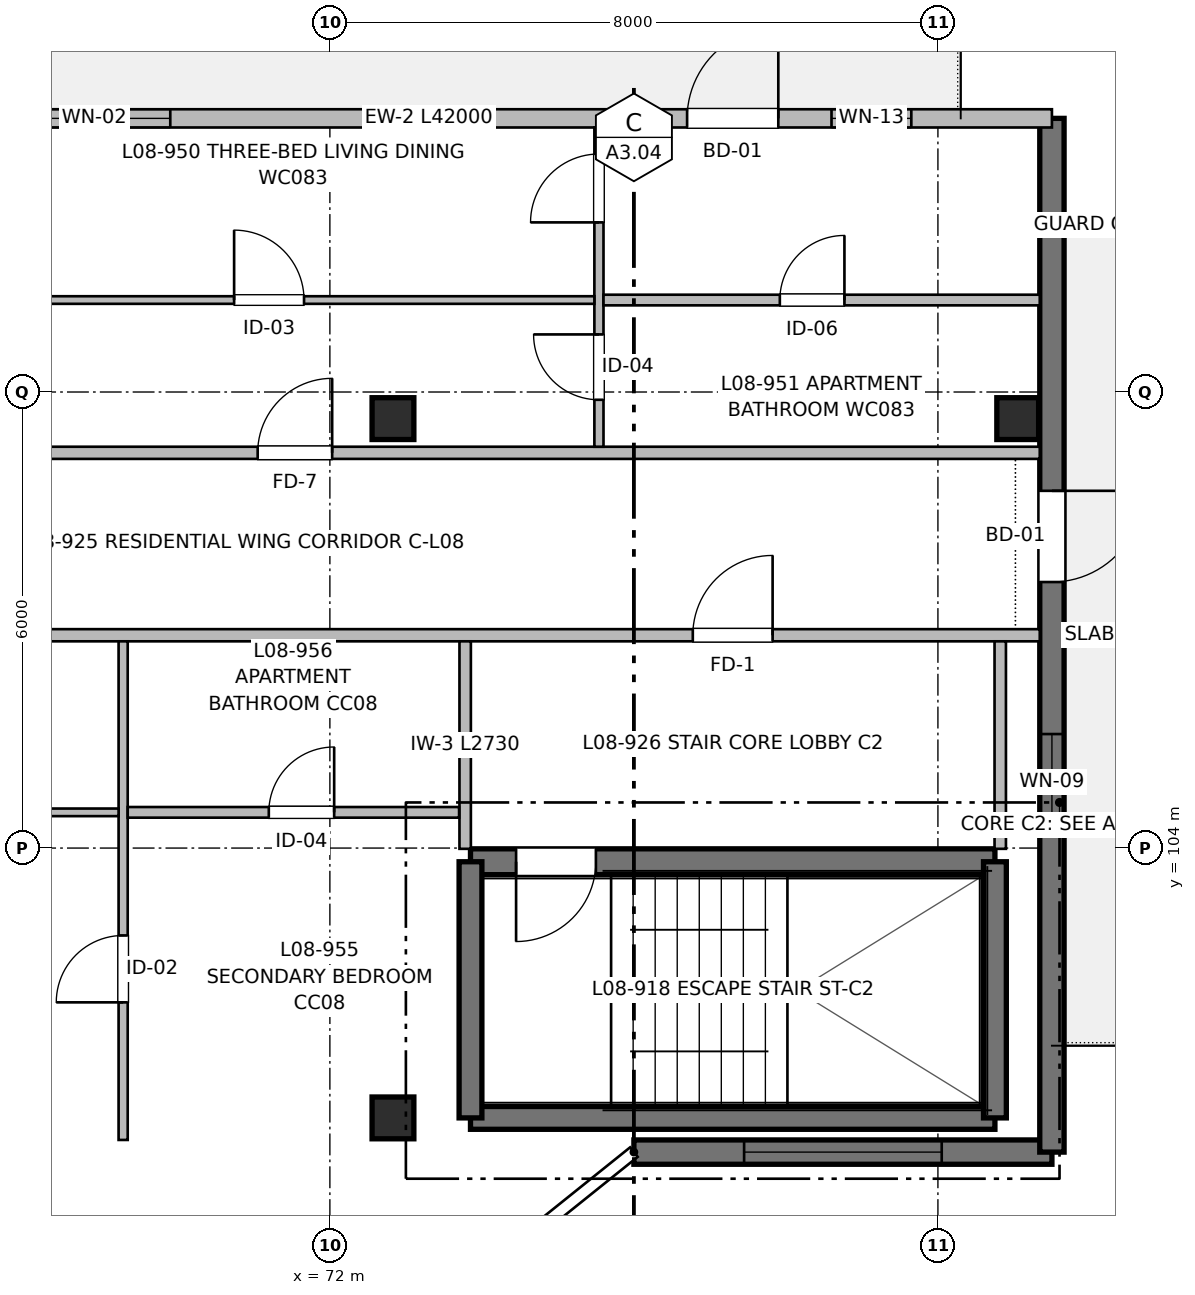
"""IFC4 building model, lengths in metres.
Left out: names, types, materials, properties, quantities, classifications, styles, units other than length and angle.
Written with IfcOpenShell. Run it as: python <this file> out.ifc"""

import sys

from ifc_helpers import new_model, si_unit, direction, frame, frame_2d, origin, origin_2d, place, context, subcontext, project, spatial, rectangle, extrude, element, fill, save


model = new_model("IFC4")
c1 = context("Model", 3, precision=1e-05, world=origin(), true_north=direction((0.0, 1.0)))
c2 = subcontext(c1, "Body", "Model", "MODEL_VIEW")
j1 = project(units=[si_unit("LENGTHUNIT", "METRE"), si_unit("PLANEANGLEUNIT", "RADIAN")], contexts=[c1])
p1 = place(None, origin())
s1 = spatial("IfcSite", under=j1, at=p1, CompositionType="ELEMENT")
p2 = place(p1, origin())
s2 = spatial("IfcBuilding", under=s1, at=p2, CompositionType="ELEMENT")
p3 = place(p2, frame((0.0, 0.0, 26.56)))
s3 = spatial("IfcBuildingStorey", under=s2, at=p3, CompositionType="ELEMENT", Elevation=26.56)
for number, where, z_axis, x_axis in (
    (1, (72.83, 100.45, 0.0), (0.0, 0.0, 1.0), (1.0, 0.0, 0.0)),
    (2, (72.83, 109.65, 0.0), (0.0, 0.0, 1.0), (1.0, 0.0, 0.0)),
    (3, (81.05, 109.65, 0.0), (0.0, 0.0, 1.0), (1.0, 0.0, 0.0)),
):
    element("IfcColumn", number, at=place(p3, frame(where, z_axis=z_axis, x_axis=x_axis)), inside=s3, PredefinedType="COLUMN", context=c2, shape_type="SweptSolid", body=[
        extrude(rectangle(XDim=0.55, YDim=0.55, at=origin_2d()), origin(), (0.0, 0.0, 1.0), 3.2),
    ])
p4 = place(p3, frame((73.85, 100.45, 0.0), z_axis=(0.0, 0.0, 1.0), x_axis=(1.0, 0.0, 0.0)))
e4 = element("IfcWall", 4, at=p4, inside=s3, PredefinedType="SHEAR", context=c2, shape_type="SweptSolid", body=[
    extrude(rectangle(XDim=6.9, YDim=0.3, at=frame_2d((3.45, 0.0))), origin(), (0.0, 0.0, 1.0), 3.2),
])
p5 = place(p3, frame((80.75, 103.82, 0.0), z_axis=(0.0, 0.0, 1.0), x_axis=(-1.0, 0.0, 0.0)))
e5 = element("IfcWall", 5, at=p5, inside=s3, PredefinedType="SHEAR", context=c2, shape_type="SweptSolid", body=[
    extrude(rectangle(XDim=6.9, YDim=0.34, at=frame_2d((3.45, 0.0))), origin(), (0.0, 0.0, 1.0), 3.2),
])
p6 = place(p5, frame((5.25, 0.0, 0.0)))
e6 = element("IfcOpeningElement", 6, at=p6, cuts=e5, PredefinedType="OPENING", context=c2, shape_type="SweptSolid", body=[
    extrude(rectangle(XDim=1.05, YDim=2.15, at=frame_2d((0.525, 1.075))), frame((0.0, 0.18, 0.0), z_axis=(0.0, -1.0, 0.0), x_axis=(1.0, 0.0, 0.0)), (0.0, 0.0, 1.0), 0.36),
])
for number, where, z_axis, x_axis in (
    (7, (73.85, 103.82, 0.0), (0.0, 0.0, 1.0), (0.0, -1.0, 0.0)),
    (8, (80.75, 100.45, 0.0), (0.0, 0.0, 1.0), (0.0, 1.0, 0.0)),
):
    element("IfcWall", number, at=place(p3, frame(where, z_axis=z_axis, x_axis=x_axis)), inside=s3, PredefinedType="SHEAR", context=c2, shape_type="SweptSolid", body=[
        extrude(rectangle(XDim=3.37, YDim=0.3, at=frame_2d((1.685, 0.0))), origin(), (0.0, 0.0, 1.0), 3.2),
    ])
p7 = place(p3, frame((81.5, 100.0, 0.0), z_axis=(0.0, 0.0, 1.0), x_axis=(-1.0, 0.0, 0.0)))
e9 = element("IfcWall", 9, at=p7, inside=s3, PredefinedType="SHEAR", context=c2, shape_type="SweptSolid", body=[
    extrude(rectangle(XDim=5.5, YDim=0.32, at=frame_2d((2.75, 0.0))), origin(), (0.0, 0.0, 1.0), 2.98),
])
p8 = place(p7, frame((1.45, 0.0, 0.67)))
e10 = element("IfcOpeningElement", 10, at=p8, cuts=e9, PredefinedType="OPENING", context=c2, shape_type="SweptSolid", body=[
    extrude(rectangle(XDim=2.6, YDim=1.55, at=frame_2d((1.3, 0.775))), frame((0.0, 0.17, 0.0), z_axis=(0.0, -1.0, 0.0), x_axis=(1.0, 0.0, 0.0)), (0.0, 0.0, 1.0), 0.34),
])
p9 = place(p3, frame((81.5, 113.6, 0.0), z_axis=(0.0, 0.0, 1.0), x_axis=(0.0, -1.0, 0.0)))
e11 = element("IfcWall", 11, at=p9, inside=s3, PredefinedType="SHEAR", context=c2, shape_type="SweptSolid", body=[
    extrude(rectangle(XDim=13.6, YDim=0.32, at=frame_2d((6.8, 0.0))), origin(), (0.0, 0.0, 1.0), 2.98),
])
p10 = place(p9, frame((4.9, 0.0, 0.0)))
e12 = element("IfcOpeningElement", 12, at=p10, cuts=e11, PredefinedType="OPENING", context=c2, shape_type="SweptSolid", body=[
    extrude(rectangle(XDim=1.2, YDim=2.2, at=frame_2d((0.6, 1.1))), frame((0.0, 0.17, 0.0), z_axis=(0.0, -1.0, 0.0), x_axis=(1.0, 0.0, 0.0)), (0.0, 0.0, 1.0), 0.34),
])
p11 = place(p9, frame((8.1, 0.0, 0.87)))
e13 = element("IfcOpeningElement", 13, at=p11, cuts=e11, PredefinedType="OPENING", context=c2, shape_type="SweptSolid", body=[
    extrude(rectangle(XDim=1.25, YDim=1.35, at=frame_2d((0.625, 0.675))), frame((0.0, 0.17, 0.0), z_axis=(0.0, -1.0, 0.0), x_axis=(1.0, 0.0, 0.0)), (0.0, 0.0, 1.0), 0.34),
])
p12 = place(p3, frame((39.5, 113.6, 0.0), z_axis=(0.0, 0.0, 1.0), x_axis=(1.0, 0.0, 0.0)))
e14 = element("IfcWall", 14, at=p12, inside=s3, PredefinedType="SOLIDWALL", context=c2, shape_type="SweptSolid", body=[
    extrude(rectangle(XDim=42.0, YDim=0.24, at=frame_2d((21.0, 0.0))), origin(), (0.0, 0.0, 1.0), 2.98),
])
p13 = place(p12, frame((3.6, 0.0, 0.0)))
e15 = element("IfcOpeningElement", 15, at=p13, cuts=e14, PredefinedType="OPENING", context=c2, shape_type="SweptSolid", body=[
    extrude(rectangle(XDim=1.2, YDim=2.2, at=frame_2d((0.6, 1.1))), frame((0.0, 0.13, 0.0), z_axis=(0.0, -1.0, 0.0), x_axis=(1.0, 0.0, 0.0)), (0.0, 0.0, 1.0), 0.26),
])
p14 = place(p12, frame((5.5, 0.0, 0.87)))
e16 = element("IfcOpeningElement", 16, at=p14, cuts=e14, PredefinedType="OPENING", context=c2, shape_type="SweptSolid", body=[
    extrude(rectangle(XDim=1.25, YDim=1.35, at=frame_2d((0.625, 0.675))), frame((0.0, 0.13, 0.0), z_axis=(0.0, -1.0, 0.0), x_axis=(1.0, 0.0, 0.0)), (0.0, 0.0, 1.0), 0.26),
])
p15 = place(p12, frame((11.76, 0.0, 0.72)))
e17 = element("IfcOpeningElement", 17, at=p15, cuts=e14, PredefinedType="OPENING", context=c2, shape_type="SweptSolid", body=[
    extrude(rectangle(XDim=1.68, YDim=1.5, at=frame_2d((0.84, 0.75))), frame((0.0, 0.13, 0.0), z_axis=(0.0, -1.0, 0.0), x_axis=(1.0, 0.0, 0.0)), (0.0, 0.0, 1.0), 0.26),
])
p16 = place(p12, frame((20.4, 0.0, 0.0)))
e18 = element("IfcOpeningElement", 18, at=p16, cuts=e14, PredefinedType="OPENING", context=c2, shape_type="SweptSolid", body=[
    extrude(rectangle(XDim=1.2, YDim=2.2, at=frame_2d((0.6, 1.1))), frame((0.0, 0.13, 0.0), z_axis=(0.0, -1.0, 0.0), x_axis=(1.0, 0.0, 0.0)), (0.0, 0.0, 1.0), 0.26),
])
p17 = place(p12, frame((22.3, 0.0, 0.67)))
e19 = element("IfcOpeningElement", 19, at=p17, cuts=e14, PredefinedType="OPENING", context=c2, shape_type="SweptSolid", body=[
    extrude(rectangle(XDim=2.1, YDim=1.55, at=frame_2d((1.05, 0.775))), frame((0.0, 0.13, 0.0), z_axis=(0.0, -1.0, 0.0), x_axis=(1.0, 0.0, 0.0)), (0.0, 0.0, 1.0), 0.26),
])
p18 = place(p12, frame((28.4, 0.0, 0.72)))
e20 = element("IfcOpeningElement", 20, at=p18, cuts=e14, PredefinedType="OPENING", context=c2, shape_type="SweptSolid", body=[
    extrude(rectangle(XDim=2.0, YDim=1.5, at=frame_2d((1.0, 0.75))), frame((0.0, 0.13, 0.0), z_axis=(0.0, -1.0, 0.0), x_axis=(1.0, 0.0, 0.0)), (0.0, 0.0, 1.0), 0.26),
])
p19 = place(p12, frame((37.2, 0.0, 0.0)))
e21 = element("IfcOpeningElement", 21, at=p19, cuts=e14, PredefinedType="OPENING", context=c2, shape_type="SweptSolid", body=[
    extrude(rectangle(XDim=1.2, YDim=2.2, at=frame_2d((0.6, 1.1))), frame((0.0, 0.13, 0.0), z_axis=(0.0, -1.0, 0.0), x_axis=(1.0, 0.0, 0.0)), (0.0, 0.0, 1.0), 0.26),
])
p20 = place(p12, frame((39.1, 0.0, 0.9)))
e22 = element("IfcOpeningElement", 22, at=p20, cuts=e14, PredefinedType="OPENING", context=c2, shape_type="SweptSolid", body=[
    extrude(rectangle(XDim=1.05, YDim=1.15, at=frame_2d((0.525, 0.575))), frame((0.0, 0.13, 0.0), z_axis=(0.0, -1.0, 0.0), x_axis=(1.0, 0.0, 0.0)), (0.0, 0.0, 1.0), 0.26),
])
p21 = place(p3, frame((57.2, 106.8, 0.0), z_axis=(0.0, 0.0, 1.0), x_axis=(1.0, 0.0, 0.0)))
e23 = element("IfcWall", 23, at=p21, inside=s3, PredefinedType="PARTITIONING", context=c2, shape_type="SweptSolid", body=[
    extrude(rectangle(XDim=24.14, YDim=0.16, at=frame_2d((12.07, 0.0))), origin(), (0.0, 0.0, 1.0), 2.935),
])
p22 = place(p21, frame((19.575, 0.0, 0.0)))
e24 = element("IfcOpeningElement", 24, at=p22, cuts=e23, PredefinedType="OPENING", context=c2, shape_type="SweptSolid", body=[
    extrude(rectangle(XDim=1.05, YDim=2.15, at=frame_2d((0.525, 1.075))), frame((0.0, 0.09, 0.0), z_axis=(0.0, -1.0, 0.0), x_axis=(1.0, 0.0, 0.0)), (0.0, 0.0, 1.0), 0.18),
])
p23 = place(p21, frame((8.995, 0.0, 0.0)))
e25 = element("IfcOpeningElement", 25, at=p23, cuts=e23, PredefinedType="OPENING", context=c2, shape_type="SweptSolid", body=[
    extrude(rectangle(XDim=0.98, YDim=2.15, at=frame_2d((0.49, 1.075))), frame((0.0, 0.09, 0.0), z_axis=(0.0, -1.0, 0.0), x_axis=(1.0, 0.0, 0.0)), (0.0, 0.0, 1.0), 0.18),
])
p24 = place(p3, frame((39.66, 109.2, 0.0), z_axis=(0.0, 0.0, 1.0), x_axis=(1.0, 0.0, 0.0)))
e26 = element("IfcWall", 26, at=p24, inside=s3, PredefinedType="PARTITIONING", context=c2, shape_type="SweptSolid", body=[
    extrude(rectangle(XDim=41.68, YDim=0.16, at=frame_2d((20.84, 0.0))), origin(), (0.0, 0.0, 1.0), 2.935),
])
p25 = place(p24, frame((3.51, 0.0, 0.0)))
e27 = element("IfcOpeningElement", 27, at=p25, cuts=e26, PredefinedType="OPENING", context=c2, shape_type="SweptSolid", body=[
    extrude(rectangle(XDim=0.98, YDim=2.15, at=frame_2d((0.49, 1.075))), frame((0.0, 0.09, 0.0), z_axis=(0.0, -1.0, 0.0), x_axis=(1.0, 0.0, 0.0)), (0.0, 0.0, 1.0), 0.18),
])
p26 = place(p24, frame((17.47, 0.0, 0.0)))
e28 = element("IfcOpeningElement", 28, at=p26, cuts=e26, PredefinedType="OPENING", context=c2, shape_type="SweptSolid", body=[
    extrude(rectangle(XDim=0.98, YDim=2.15, at=frame_2d((0.49, 1.075))), frame((0.0, 0.09, 0.0), z_axis=(0.0, -1.0, 0.0), x_axis=(1.0, 0.0, 0.0)), (0.0, 0.0, 1.0), 0.18),
])
p27 = place(p24, frame((31.39, 0.0, 0.0)))
e29 = element("IfcOpeningElement", 29, at=p27, cuts=e26, PredefinedType="OPENING", context=c2, shape_type="SweptSolid", body=[
    extrude(rectangle(XDim=0.98, YDim=2.15, at=frame_2d((0.49, 1.075))), frame((0.0, 0.09, 0.0), z_axis=(0.0, -1.0, 0.0), x_axis=(1.0, 0.0, 0.0)), (0.0, 0.0, 1.0), 0.18),
])
for number, where, z_axis, x_axis in (
    (30, (73.78, 103.99, 0.0), (0.0, 0.0, 1.0), (0.0, 1.0, 0.0)),
    (31, (80.82, 103.99, 0.0), (0.0, 0.0, 1.0), (0.0, 1.0, 0.0)),
):
    element("IfcWall", number, at=place(p3, frame(where, z_axis=z_axis, x_axis=x_axis)), inside=s3, PredefinedType="PARTITIONING", context=c2, shape_type="SweptSolid", body=[
        extrude(rectangle(XDim=2.73, YDim=0.15, at=frame_2d((1.365, 0.0))), origin(), (0.0, 0.0, 1.0), 2.935),
    ])
p28 = place(p3, frame((75.54, 109.28, 0.0), z_axis=(0.0, 0.0, 1.0), x_axis=(0.0, 1.0, 0.0)))
e32 = element("IfcWall", 32, at=p28, inside=s3, PredefinedType="PARTITIONING", context=c2, shape_type="SweptSolid", body=[
    extrude(rectangle(XDim=4.2, YDim=0.12, at=frame_2d((2.1, 0.0))), origin(), (0.0, 0.0, 1.0), 2.935),
])
p29 = place(p28, frame((0.618, 0.0, 0.0)))
e33 = element("IfcOpeningElement", 33, at=p29, cuts=e32, PredefinedType="OPENING", context=c2, shape_type="SweptSolid", body=[
    extrude(rectangle(XDim=0.86, YDim=2.1, at=frame_2d((0.43, 1.05))), frame((0.0, 0.07, 0.0), z_axis=(0.0, -1.0, 0.0), x_axis=(1.0, 0.0, 0.0)), (0.0, 0.0, 1.0), 0.14),
])
p30 = place(p28, frame((2.951, 0.0, 0.0)))
e34 = element("IfcOpeningElement", 34, at=p30, cuts=e32, PredefinedType="OPENING", context=c2, shape_type="SweptSolid", body=[
    extrude(rectangle(XDim=0.9, YDim=2.1, at=frame_2d((0.45, 1.05))), frame((0.0, 0.07, 0.0), z_axis=(0.0, -1.0, 0.0), x_axis=(1.0, 0.0, 0.0)), (0.0, 0.0, 1.0), 0.14),
])
p31 = place(p3, frame((75.6, 111.21, 0.0), z_axis=(0.0, 0.0, 1.0), x_axis=(1.0, 0.0, 0.0)))
e35 = element("IfcWall", 35, at=p31, inside=s3, PredefinedType="PARTITIONING", context=c2, shape_type="SweptSolid", body=[
    extrude(rectangle(XDim=5.74, YDim=0.14, at=frame_2d((2.87, 0.0))), origin(), (0.0, 0.0, 1.0), 2.935),
])
p32 = place(p31, frame((2.32, 0.0, 0.0)))
e36 = element("IfcOpeningElement", 36, at=p32, cuts=e35, PredefinedType="OPENING", context=c2, shape_type="SweptSolid", body=[
    extrude(rectangle(XDim=0.85, YDim=2.05, at=frame_2d((0.425, 1.025))), frame((0.0, 0.08, 0.0), z_axis=(0.0, -1.0, 0.0), x_axis=(1.0, 0.0, 0.0)), (0.0, 0.0, 1.0), 0.16),
])
p33 = place(p3, frame((67.54, 111.21, 0.0), z_axis=(0.0, 0.0, 1.0), x_axis=(1.0, 0.0, 0.0)))
e37 = element("IfcWall", 37, at=p33, inside=s3, PredefinedType="PARTITIONING", context=c2, shape_type="SweptSolid", body=[
    extrude(rectangle(XDim=7.94, YDim=0.1, at=frame_2d((3.97, 0.0))), origin(), (0.0, 0.0, 1.0), 2.935),
])
p34 = place(p33, frame((3.2, 0.0, 0.0)))
e38 = element("IfcOpeningElement", 38, at=p34, cuts=e37, PredefinedType="OPENING", context=c2, shape_type="SweptSolid", body=[
    extrude(rectangle(XDim=0.92, YDim=2.1, at=frame_2d((0.46, 1.05))), frame((0.0, 0.06, 0.0), z_axis=(0.0, -1.0, 0.0), x_axis=(1.0, 0.0, 0.0)), (0.0, 0.0, 1.0), 0.12),
])
p35 = place(p3, frame((69.28, 100.16, 0.0), z_axis=(0.0, 0.0, 1.0), x_axis=(0.0, 1.0, 0.0)))
e39 = element("IfcWall", 39, at=p35, inside=s3, PredefinedType="PARTITIONING", context=c2, shape_type="SweptSolid", body=[
    extrude(rectangle(XDim=6.56, YDim=0.12, at=frame_2d((3.28, 0.0))), origin(), (0.0, 0.0, 1.0), 2.935),
])
p36 = place(p35, frame((1.81, 0.0, 0.0)))
e40 = element("IfcOpeningElement", 40, at=p36, cuts=e39, PredefinedType="OPENING", context=c2, shape_type="SweptSolid", body=[
    extrude(rectangle(XDim=0.88, YDim=2.1, at=frame_2d((0.44, 1.05))), frame((0.0, 0.07, 0.0), z_axis=(0.0, -1.0, 0.0), x_axis=(1.0, 0.0, 0.0)), (0.0, 0.0, 1.0), 0.14),
])
p37 = place(p3, frame((69.34, 104.47, 0.0), z_axis=(0.0, 0.0, 1.0), x_axis=(1.0, 0.0, 0.0)))
e41 = element("IfcWall", 41, at=p37, inside=s3, PredefinedType="PARTITIONING", context=c2, shape_type="SweptSolid", body=[
    extrude(rectangle(XDim=4.36, YDim=0.14, at=frame_2d((2.18, 0.0))), origin(), (0.0, 0.0, 1.0), 2.935),
])
p38 = place(p37, frame((1.856, 0.0, 0.0)))
e42 = element("IfcOpeningElement", 42, at=p38, cuts=e41, PredefinedType="OPENING", context=c2, shape_type="SweptSolid", body=[
    extrude(rectangle(XDim=0.86, YDim=2.1, at=frame_2d((0.43, 1.05))), frame((0.0, 0.08, 0.0), z_axis=(0.0, -1.0, 0.0), x_axis=(1.0, 0.0, 0.0)), (0.0, 0.0, 1.0), 0.16),
])
p39 = place(p3, frame((64.09, 104.47, 0.0), z_axis=(0.0, 0.0, 1.0), x_axis=(1.0, 0.0, 0.0)))
e43 = element("IfcWall", 43, at=p39, inside=s3, PredefinedType="PARTITIONING", context=c2, shape_type="SweptSolid", body=[
    extrude(rectangle(XDim=5.13, YDim=0.1, at=frame_2d((2.565, 0.0))), origin(), (0.0, 0.0, 1.0), 2.935),
])
p40 = place(p39, frame((2.18, 0.0, 0.0)))
e44 = element("IfcOpeningElement", 44, at=p40, cuts=e43, PredefinedType="OPENING", context=c2, shape_type="SweptSolid", body=[
    extrude(rectangle(XDim=0.92, YDim=2.1, at=frame_2d((0.46, 1.05))), frame((0.0, 0.06, 0.0), z_axis=(0.0, -1.0, 0.0), x_axis=(1.0, 0.0, 0.0)), (0.0, 0.0, 1.0), 0.12),
])
p41 = place(p6, origin())
e45 = element("IfcDoor", 45, at=p41, inside=s3, OperationType="SINGLE_SWING_RIGHT", PredefinedType="DOOR", context=c2, shape_type="SweptSolid", body=[
    extrude(rectangle(XDim=1.05, YDim=2.15, at=frame_2d((0.525, 1.075))), frame((0.0, 0.025, 0.0), z_axis=(0.0, -1.0, 0.0), x_axis=(1.0, 0.0, 0.0)), (0.0, 0.0, 1.0), 0.05),
])
fill(e6, e45)
p42 = place(p8, origin())
e46 = element("IfcWindow", 46, at=p42, inside=s3, PartitioningType="SINGLE_PANEL", PredefinedType="WINDOW", context=c2, shape_type="SweptSolid", body=[
    extrude(rectangle(XDim=2.6, YDim=1.55, at=frame_2d((1.3, 0.775))), frame((0.0, 0.03, 0.0), z_axis=(0.0, -1.0, 0.0), x_axis=(1.0, 0.0, 0.0)), (0.0, 0.0, 1.0), 0.06),
])
fill(e10, e46)
p43 = place(p10, origin())
e47 = element("IfcDoor", 47, at=p43, inside=s3, OperationType="SINGLE_SWING_LEFT", PredefinedType="DOOR", context=c2, shape_type="SweptSolid", body=[
    extrude(rectangle(XDim=1.2, YDim=2.2, at=frame_2d((0.6, 1.1))), frame((0.0, 0.025, 0.0), z_axis=(0.0, -1.0, 0.0), x_axis=(1.0, 0.0, 0.0)), (0.0, 0.0, 1.0), 0.05),
])
fill(e12, e47)
p44 = place(p11, origin())
e48 = element("IfcWindow", 48, at=p44, inside=s3, PartitioningType="SINGLE_PANEL", PredefinedType="WINDOW", context=c2, shape_type="SweptSolid", body=[
    extrude(rectangle(XDim=1.25, YDim=1.35, at=frame_2d((0.625, 0.675))), frame((0.0, 0.03, 0.0), z_axis=(0.0, -1.0, 0.0), x_axis=(1.0, 0.0, 0.0)), (0.0, 0.0, 1.0), 0.06),
])
fill(e13, e48)
p45 = place(p18, origin())
e49 = element("IfcWindow", 49, at=p45, inside=s3, PartitioningType="SINGLE_PANEL", PredefinedType="WINDOW", context=c2, shape_type="SweptSolid", body=[
    extrude(rectangle(XDim=2.0, YDim=1.5, at=frame_2d((1.0, 0.75))), frame((0.0, 0.03, 0.0), z_axis=(0.0, -1.0, 0.0), x_axis=(1.0, 0.0, 0.0)), (0.0, 0.0, 1.0), 0.06),
])
fill(e20, e49)
p46 = place(p19, origin())
e50 = element("IfcDoor", 50, at=p46, inside=s3, OperationType="SINGLE_SWING_RIGHT", PredefinedType="DOOR", context=c2, shape_type="SweptSolid", body=[
    extrude(rectangle(XDim=1.2, YDim=2.2, at=frame_2d((0.6, 1.1))), frame((0.0, 0.025, 0.0), z_axis=(0.0, -1.0, 0.0), x_axis=(1.0, 0.0, 0.0)), (0.0, 0.0, 1.0), 0.05),
])
fill(e21, e50)
p47 = place(p20, origin())
e51 = element("IfcWindow", 51, at=p47, inside=s3, PartitioningType="SINGLE_PANEL", PredefinedType="WINDOW", context=c2, shape_type="SweptSolid", body=[
    extrude(rectangle(XDim=1.05, YDim=1.15, at=frame_2d((0.525, 0.575))), frame((0.0, 0.03, 0.0), z_axis=(0.0, -1.0, 0.0), x_axis=(1.0, 0.0, 0.0)), (0.0, 0.0, 1.0), 0.06),
])
fill(e22, e51)
p48 = place(p22, origin())
e52 = element("IfcDoor", 52, at=p48, inside=s3, OperationType="SINGLE_SWING_RIGHT", PredefinedType="DOOR", context=c2, shape_type="SweptSolid", body=[
    extrude(rectangle(XDim=1.05, YDim=2.15, at=frame_2d((0.525, 1.075))), frame((0.0, 0.025, 0.0), z_axis=(0.0, -1.0, 0.0), x_axis=(1.0, 0.0, 0.0)), (0.0, 0.0, 1.0), 0.05),
])
fill(e24, e52)
p49 = place(p27, origin())
e53 = element("IfcDoor", 53, at=p49, inside=s3, OperationType="SINGLE_SWING_RIGHT", PredefinedType="DOOR", context=c2, shape_type="SweptSolid", body=[
    extrude(rectangle(XDim=0.98, YDim=2.15, at=frame_2d((0.49, 1.075))), frame((0.0, 0.025, 0.0), z_axis=(0.0, -1.0, 0.0), x_axis=(1.0, 0.0, 0.0)), (0.0, 0.0, 1.0), 0.05),
])
fill(e29, e53)
p50 = place(p34, origin())
e54 = element("IfcDoor", 54, at=p50, inside=s3, OperationType="SINGLE_SWING_LEFT", PredefinedType="DOOR", context=c2, shape_type="SweptSolid", body=[
    extrude(rectangle(XDim=0.92, YDim=2.1, at=frame_2d((0.46, 1.05))), frame((0.0, 0.025, 0.0), z_axis=(0.0, -1.0, 0.0), x_axis=(1.0, 0.0, 0.0)), (0.0, 0.0, 1.0), 0.05),
])
fill(e38, e54)
p51 = place(p29, origin())
e55 = element("IfcDoor", 55, at=p51, inside=s3, OperationType="SINGLE_SWING_RIGHT", PredefinedType="DOOR", context=c2, shape_type="SweptSolid", body=[
    extrude(rectangle(XDim=0.86, YDim=2.1, at=frame_2d((0.43, 1.05))), frame((0.0, 0.025, 0.0), z_axis=(0.0, -1.0, 0.0), x_axis=(1.0, 0.0, 0.0)), (0.0, 0.0, 1.0), 0.05),
])
fill(e33, e55)
p52 = place(p30, origin())
e56 = element("IfcDoor", 56, at=p52, inside=s3, OperationType="SINGLE_SWING_LEFT", PredefinedType="DOOR", context=c2, shape_type="SweptSolid", body=[
    extrude(rectangle(XDim=0.9, YDim=2.1, at=frame_2d((0.45, 1.05))), frame((0.0, 0.025, 0.0), z_axis=(0.0, -1.0, 0.0), x_axis=(1.0, 0.0, 0.0)), (0.0, 0.0, 1.0), 0.05),
])
fill(e34, e56)
p53 = place(p32, origin())
e57 = element("IfcDoor", 57, at=p53, inside=s3, OperationType="SINGLE_SWING_RIGHT", PredefinedType="DOOR", context=c2, shape_type="SweptSolid", body=[
    extrude(rectangle(XDim=0.85, YDim=2.05, at=frame_2d((0.425, 1.025))), frame((0.0, 0.025, 0.0), z_axis=(0.0, -1.0, 0.0), x_axis=(1.0, 0.0, 0.0)), (0.0, 0.0, 1.0), 0.05),
])
fill(e36, e57)
p54 = place(p36, origin())
e58 = element("IfcDoor", 58, at=p54, inside=s3, OperationType="SINGLE_SWING_LEFT", PredefinedType="DOOR", context=c2, shape_type="SweptSolid", body=[
    extrude(rectangle(XDim=0.88, YDim=2.1, at=frame_2d((0.44, 1.05))), frame((0.0, 0.025, 0.0), z_axis=(0.0, -1.0, 0.0), x_axis=(1.0, 0.0, 0.0)), (0.0, 0.0, 1.0), 0.05),
])
fill(e40, e58)
p55 = place(p38, origin())
e59 = element("IfcDoor", 59, at=p55, inside=s3, OperationType="SINGLE_SWING_RIGHT", PredefinedType="DOOR", context=c2, shape_type="SweptSolid", body=[
    extrude(rectangle(XDim=0.86, YDim=2.1, at=frame_2d((0.43, 1.05))), frame((0.0, 0.025, 0.0), z_axis=(0.0, -1.0, 0.0), x_axis=(1.0, 0.0, 0.0)), (0.0, 0.0, 1.0), 0.05),
])
fill(e42, e59)
save(model, sys.argv[1])
